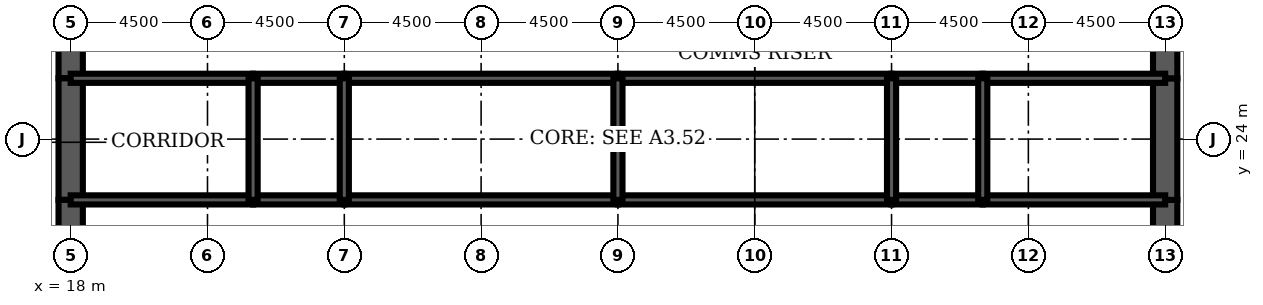
"""IFC4 building model, lengths in metres.
Left out: names, types, materials, properties, quantities, classifications, styles, units other than length and angle.
Written with IfcOpenShell. Run it as: python <this file> out.ifc"""

import sys

from ifc_helpers import new_model, si_unit, direction, frame, frame_2d, origin, place, context, subcontext, project, spatial, rectangle, extrude, element, fill, save


model = new_model("IFC4")
c1 = context("Model", 3, precision=1e-05, world=origin(), true_north=direction((0.0, 1.0)))
c2 = subcontext(c1, "Body", "Model", "MODEL_VIEW")
j1 = project(units=[si_unit("LENGTHUNIT", "METRE"), si_unit("PLANEANGLEUNIT", "RADIAN")], contexts=[c1])
p1 = place(None, origin())
s1 = spatial("IfcSite", under=j1, at=p1, CompositionType="ELEMENT")
p2 = place(p1, origin())
s2 = spatial("IfcBuilding", under=s1, at=p2, CompositionType="ELEMENT")
p3 = place(p2, frame((0.0, 0.0, 223.6)))
s3 = spatial("IfcBuildingStorey", under=s2, at=p3, CompositionType="ELEMENT", Elevation=223.6)
p4 = place(p3, frame((18.0, 28.8, 0.0), z_axis=(0.0, 0.0, 1.0), x_axis=(0.0, -1.0, 0.0)))
e1 = element("IfcWall", 1, at=p4, inside=s3, PredefinedType="SHEAR", context=c2, shape_type="SweptSolid", body=[
    extrude(rectangle(XDim=2.8, YDim=0.8, at=frame_2d((1.4, 0.0))), origin(), (0.0, 0.0, 1.0), 4.2),
])
p5 = place(p4, frame((0.4, 0.0, 0.0)))
e2 = element("IfcOpeningElement", 2, at=p5, cuts=e1, PredefinedType="OPENING", context=c2, shape_type="SweptSolid", body=[
    extrude(rectangle(XDim=1.8, YDim=2.1, at=frame_2d((0.9, 1.05))), frame((0.0, 0.41, 0.0), z_axis=(0.0, -1.0, 0.0), x_axis=(1.0, 0.0, 0.0)), (0.0, 0.0, 1.0), 0.82),
])
p6 = place(p3, frame((18.0, 26.0, 0.0), z_axis=(0.0, 0.0, 1.0), x_axis=(0.0, -1.0, 0.0)))
e3 = element("IfcWall", 3, at=p6, inside=s3, PredefinedType="SHEAR", context=c2, shape_type="SweptSolid", body=[
    extrude(rectangle(XDim=4.0, YDim=0.8, at=frame_2d((2.0, 0.0))), origin(), (0.0, 0.0, 1.0), 4.2),
])
p7 = place(p3, frame((18.0, 22.0, 0.0), z_axis=(0.0, 0.0, 1.0), x_axis=(0.0, -1.0, 0.0)))
e4 = element("IfcWall", 4, at=p7, inside=s3, PredefinedType="SHEAR", context=c2, shape_type="SweptSolid", body=[
    extrude(rectangle(XDim=2.8, YDim=0.8, at=frame_2d((1.4, 0.0))), origin(), (0.0, 0.0, 1.0), 4.2),
])
p8 = place(p7, frame((0.6, 0.0, 0.0)))
e5 = element("IfcOpeningElement", 5, at=p8, cuts=e4, PredefinedType="OPENING", context=c2, shape_type="SweptSolid", body=[
    extrude(rectangle(XDim=1.8, YDim=2.1, at=frame_2d((0.9, 1.05))), frame((0.0, 0.41, 0.0), z_axis=(0.0, -1.0, 0.0), x_axis=(1.0, 0.0, 0.0)), (0.0, 0.0, 1.0), 0.82),
])
p9 = place(p3, frame((54.0, 19.2, 0.0), z_axis=(0.0, 0.0, 1.0), x_axis=(0.0, 1.0, 0.0)))
e6 = element("IfcWall", 6, at=p9, inside=s3, PredefinedType="SHEAR", context=c2, shape_type="SweptSolid", body=[
    extrude(rectangle(XDim=2.8, YDim=0.8, at=frame_2d((1.4, 0.0))), origin(), (0.0, 0.0, 1.0), 4.2),
])
p10 = place(p9, frame((0.4, 0.0, 0.0)))
e7 = element("IfcOpeningElement", 7, at=p10, cuts=e6, PredefinedType="OPENING", context=c2, shape_type="SweptSolid", body=[
    extrude(rectangle(XDim=1.8, YDim=2.1, at=frame_2d((0.9, 1.05))), frame((0.0, 0.41, 0.0), z_axis=(0.0, -1.0, 0.0), x_axis=(1.0, 0.0, 0.0)), (0.0, 0.0, 1.0), 0.82),
])
p11 = place(p3, frame((54.0, 22.0, 0.0), z_axis=(0.0, 0.0, 1.0), x_axis=(0.0, 1.0, 0.0)))
e8 = element("IfcWall", 8, at=p11, inside=s3, PredefinedType="SHEAR", context=c2, shape_type="SweptSolid", body=[
    extrude(rectangle(XDim=4.0, YDim=0.8, at=frame_2d((2.0, 0.0))), origin(), (0.0, 0.0, 1.0), 4.2),
])
p12 = place(p3, frame((54.0, 26.0, 0.0), z_axis=(0.0, 0.0, 1.0), x_axis=(0.0, 1.0, 0.0)))
e9 = element("IfcWall", 9, at=p12, inside=s3, PredefinedType="SHEAR", context=c2, shape_type="SweptSolid", body=[
    extrude(rectangle(XDim=2.8, YDim=0.8, at=frame_2d((1.4, 0.0))), origin(), (0.0, 0.0, 1.0), 4.2),
])
p13 = place(p12, frame((0.6, 0.0, 0.0)))
e10 = element("IfcOpeningElement", 10, at=p13, cuts=e9, PredefinedType="OPENING", context=c2, shape_type="SweptSolid", body=[
    extrude(rectangle(XDim=1.8, YDim=2.1, at=frame_2d((0.9, 1.05))), frame((0.0, 0.41, 0.0), z_axis=(0.0, -1.0, 0.0), x_axis=(1.0, 0.0, 0.0)), (0.0, 0.0, 1.0), 0.82),
])
p14 = place(p3, frame((18.0, 22.0, 0.0), z_axis=(0.0, 0.0, 1.0), x_axis=(1.0, 0.0, 0.0)))
e11 = element("IfcWall", 11, at=p14, inside=s3, PredefinedType="SOLIDWALL", context=c2, shape_type="SweptSolid", body=[
    extrude(rectangle(XDim=6.0, YDim=0.3, at=frame_2d((3.0, 0.0))), origin(), (0.0, 0.0, 1.0), 4.2),
])
p15 = place(p14, frame((2.0, 0.0, 0.0)))
e12 = element("IfcOpeningElement", 12, at=p15, cuts=e11, PredefinedType="OPENING", context=c2, shape_type="SweptSolid", body=[
    extrude(rectangle(XDim=1.0, YDim=2.1, at=frame_2d((0.5, 1.05))), frame((0.0, 0.16, 0.0), z_axis=(0.0, -1.0, 0.0), x_axis=(1.0, 0.0, 0.0)), (0.0, 0.0, 1.0), 0.32),
])
p16 = place(p3, frame((24.0, 22.0, 0.0), z_axis=(0.0, 0.0, 1.0), x_axis=(1.0, 0.0, 0.0)))
e13 = element("IfcWall", 13, at=p16, inside=s3, PredefinedType="SOLIDWALL", context=c2, shape_type="SweptSolid", body=[
    extrude(rectangle(XDim=3.0, YDim=0.3, at=frame_2d((1.5, 0.0))), origin(), (0.0, 0.0, 1.0), 4.2),
])
p17 = place(p16, frame((1.0, 0.0, 0.0)))
e14 = element("IfcOpeningElement", 14, at=p17, cuts=e13, PredefinedType="OPENING", context=c2, shape_type="SweptSolid", body=[
    extrude(rectangle(XDim=1.0, YDim=2.1, at=frame_2d((0.5, 1.05))), frame((0.0, 0.16, 0.0), z_axis=(0.0, -1.0, 0.0), x_axis=(1.0, 0.0, 0.0)), (0.0, 0.0, 1.0), 0.32),
])
p18 = place(p3, frame((27.0, 22.0, 0.0), z_axis=(0.0, 0.0, 1.0), x_axis=(1.0, 0.0, 0.0)))
e15 = element("IfcWall", 15, at=p18, inside=s3, PredefinedType="SOLIDWALL", context=c2, shape_type="SweptSolid", body=[
    extrude(rectangle(XDim=9.0, YDim=0.3, at=frame_2d((4.5, 0.0))), origin(), (0.0, 0.0, 1.0), 4.2),
])
p19 = place(p18, frame((4.0, 0.0, 0.0)))
e16 = element("IfcOpeningElement", 16, at=p19, cuts=e15, PredefinedType="OPENING", context=c2, shape_type="SweptSolid", body=[
    extrude(rectangle(XDim=1.0, YDim=2.1, at=frame_2d((0.5, 1.05))), frame((0.0, 0.16, 0.0), z_axis=(0.0, -1.0, 0.0), x_axis=(1.0, 0.0, 0.0)), (0.0, 0.0, 1.0), 0.32),
])
p20 = place(p3, frame((36.0, 22.0, 0.0), z_axis=(0.0, 0.0, 1.0), x_axis=(1.0, 0.0, 0.0)))
e17 = element("IfcWall", 17, at=p20, inside=s3, PredefinedType="SOLIDWALL", context=c2, shape_type="SweptSolid", body=[
    extrude(rectangle(XDim=9.0, YDim=0.3, at=frame_2d((4.5, 0.0))), origin(), (0.0, 0.0, 1.0), 4.2),
])
p21 = place(p20, frame((4.0, 0.0, 0.0)))
e18 = element("IfcOpeningElement", 18, at=p21, cuts=e17, PredefinedType="OPENING", context=c2, shape_type="SweptSolid", body=[
    extrude(rectangle(XDim=1.0, YDim=2.1, at=frame_2d((0.5, 1.05))), frame((0.0, 0.16, 0.0), z_axis=(0.0, -1.0, 0.0), x_axis=(1.0, 0.0, 0.0)), (0.0, 0.0, 1.0), 0.32),
])
p22 = place(p3, frame((45.0, 22.0, 0.0), z_axis=(0.0, 0.0, 1.0), x_axis=(1.0, 0.0, 0.0)))
e19 = element("IfcWall", 19, at=p22, inside=s3, PredefinedType="SOLIDWALL", context=c2, shape_type="SweptSolid", body=[
    extrude(rectangle(XDim=3.0, YDim=0.3, at=frame_2d((1.5, 0.0))), origin(), (0.0, 0.0, 1.0), 4.2),
])
p23 = place(p22, frame((1.0, 0.0, 0.0)))
e20 = element("IfcOpeningElement", 20, at=p23, cuts=e19, PredefinedType="OPENING", context=c2, shape_type="SweptSolid", body=[
    extrude(rectangle(XDim=1.0, YDim=2.1, at=frame_2d((0.5, 1.05))), frame((0.0, 0.16, 0.0), z_axis=(0.0, -1.0, 0.0), x_axis=(1.0, 0.0, 0.0)), (0.0, 0.0, 1.0), 0.32),
])
p24 = place(p3, frame((48.0, 22.0, 0.0), z_axis=(0.0, 0.0, 1.0), x_axis=(1.0, 0.0, 0.0)))
e21 = element("IfcWall", 21, at=p24, inside=s3, PredefinedType="SOLIDWALL", context=c2, shape_type="SweptSolid", body=[
    extrude(rectangle(XDim=6.0, YDim=0.3, at=frame_2d((3.0, 0.0))), origin(), (0.0, 0.0, 1.0), 4.2),
])
p25 = place(p24, frame((2.0, 0.0, 0.0)))
e22 = element("IfcOpeningElement", 22, at=p25, cuts=e21, PredefinedType="OPENING", context=c2, shape_type="SweptSolid", body=[
    extrude(rectangle(XDim=1.0, YDim=2.1, at=frame_2d((0.5, 1.05))), frame((0.0, 0.16, 0.0), z_axis=(0.0, -1.0, 0.0), x_axis=(1.0, 0.0, 0.0)), (0.0, 0.0, 1.0), 0.32),
])
p26 = place(p24, frame((4.35, 0.0, 0.0)))
e23 = element("IfcOpeningElement", 23, at=p26, cuts=e21, PredefinedType="OPENING", context=c2, shape_type="SweptSolid", body=[
    extrude(rectangle(XDim=1.0, YDim=2.1, at=frame_2d((0.5, 1.05))), frame((0.0, 0.16, 0.0), z_axis=(0.0, -1.0, 0.0), x_axis=(1.0, 0.0, 0.0)), (0.0, 0.0, 1.0), 0.32),
])
p27 = place(p3, frame((18.0, 26.0, 0.0), z_axis=(0.0, 0.0, 1.0), x_axis=(1.0, 0.0, 0.0)))
e24 = element("IfcWall", 24, at=p27, inside=s3, PredefinedType="SOLIDWALL", context=c2, shape_type="SweptSolid", body=[
    extrude(rectangle(XDim=6.0, YDim=0.3, at=frame_2d((3.0, 0.0))), origin(), (0.0, 0.0, 1.0), 4.2),
])
p28 = place(p3, frame((24.0, 26.0, 0.0), z_axis=(0.0, 0.0, 1.0), x_axis=(1.0, 0.0, 0.0)))
e25 = element("IfcWall", 25, at=p28, inside=s3, PredefinedType="SOLIDWALL", context=c2, shape_type="SweptSolid", body=[
    extrude(rectangle(XDim=3.0, YDim=0.3, at=frame_2d((1.5, 0.0))), origin(), (0.0, 0.0, 1.0), 4.2),
])
for number, where, z_axis, x_axis in (
    (26, (27.0, 26.0, 0.0), (0.0, 0.0, 1.0), (1.0, 0.0, 0.0)),
    (27, (36.0, 26.0, 0.0), (0.0, 0.0, 1.0), (1.0, 0.0, 0.0)),
):
    element("IfcWall", number, at=place(p3, frame(where, z_axis=z_axis, x_axis=x_axis)), inside=s3, PredefinedType="SOLIDWALL", context=c2, shape_type="SweptSolid", body=[
        extrude(rectangle(XDim=9.0, YDim=0.3, at=frame_2d((4.5, 0.0))), origin(), (0.0, 0.0, 1.0), 4.2),
    ])
p29 = place(p3, frame((45.0, 26.0, 0.0), z_axis=(0.0, 0.0, 1.0), x_axis=(1.0, 0.0, 0.0)))
e28 = element("IfcWall", 28, at=p29, inside=s3, PredefinedType="SOLIDWALL", context=c2, shape_type="SweptSolid", body=[
    extrude(rectangle(XDim=3.0, YDim=0.3, at=frame_2d((1.5, 0.0))), origin(), (0.0, 0.0, 1.0), 4.2),
])
p30 = place(p3, frame((48.0, 26.0, 0.0), z_axis=(0.0, 0.0, 1.0), x_axis=(1.0, 0.0, 0.0)))
e29 = element("IfcWall", 29, at=p30, inside=s3, PredefinedType="SOLIDWALL", context=c2, shape_type="SweptSolid", body=[
    extrude(rectangle(XDim=6.0, YDim=0.3, at=frame_2d((3.0, 0.0))), origin(), (0.0, 0.0, 1.0), 4.2),
])
for number, where, z_axis, x_axis in (
    (30, (24.0, 22.0, 0.0), (0.0, 0.0, 1.0), (0.0, 1.0, 0.0)),
    (31, (27.0, 22.0, 0.0), (0.0, 0.0, 1.0), (0.0, 1.0, 0.0)),
    (32, (36.0, 22.0, 0.0), (0.0, 0.0, 1.0), (0.0, 1.0, 0.0)),
    (33, (45.0, 22.0, 0.0), (0.0, 0.0, 1.0), (0.0, 1.0, 0.0)),
    (34, (48.0, 22.0, 0.0), (0.0, 0.0, 1.0), (0.0, 1.0, 0.0)),
):
    element("IfcWall", number, at=place(p3, frame(where, z_axis=z_axis, x_axis=x_axis)), inside=s3, PredefinedType="SOLIDWALL", context=c2, shape_type="SweptSolid", body=[
        extrude(rectangle(XDim=4.0, YDim=0.3, at=frame_2d((2.0, 0.0))), origin(), (0.0, 0.0, 1.0), 4.2),
    ])
p31 = place(p3, frame((42.0, 22.15, 0.0), z_axis=(0.0, 0.0, 1.0), x_axis=(0.0, 1.0, 0.0)))
e35 = element("IfcWall", 35, at=p31, inside=s3, PredefinedType="PARTITIONING", context=c2, shape_type="SweptSolid", body=[
    extrude(rectangle(XDim=3.7, YDim=0.15, at=frame_2d((1.85, 0.0))), origin(), (0.0, 0.0, 1.0), 3.0),
])
p32 = place(p31, frame((2.2, 0.0, 0.0)))
e36 = element("IfcOpeningElement", 36, at=p32, cuts=e35, PredefinedType="OPENING", context=c2, shape_type="SweptSolid", body=[
    extrude(rectangle(XDim=1.0, YDim=2.1, at=frame_2d((0.5, 1.05))), frame((0.0, 0.085, 0.0), z_axis=(0.0, -1.0, 0.0), x_axis=(1.0, 0.0, 0.0)), (0.0, 0.0, 1.0), 0.17),
])
p33 = place(p3, frame((52.025, 22.15, 0.0), z_axis=(0.0, 0.0, 1.0), x_axis=(0.0, 1.0, 0.0)))
e37 = element("IfcWall", 37, at=p33, inside=s3, PredefinedType="PARTITIONING", context=c2, shape_type="SweptSolid", body=[
    extrude(rectangle(XDim=3.7, YDim=0.15, at=frame_2d((1.85, 0.0))), origin(), (0.0, 0.0, 1.0), 3.0),
])
p34 = place(p32, origin())
e38 = element("IfcDoor", 38, at=p34, inside=s3, OperationType="SINGLE_SWING_RIGHT", PredefinedType="DOOR", context=c2, shape_type="SweptSolid", body=[
    extrude(rectangle(XDim=1.0, YDim=2.1, at=frame_2d((0.5, 1.05))), frame((0.0, 0.025, 0.0), z_axis=(0.0, -1.0, 0.0), x_axis=(1.0, 0.0, 0.0)), (0.0, 0.0, 1.0), 0.05),
])
fill(e36, e38)
p35 = place(p8, origin())
e39 = element("IfcDoor", 39, at=p35, inside=s3, OperationType="SINGLE_SWING_LEFT", PredefinedType="DOOR", context=c2, shape_type="SweptSolid", body=[
    extrude(rectangle(XDim=1.8, YDim=2.1, at=frame_2d((0.9, 1.05))), frame((0.0, 0.4, 0.0), z_axis=(0.0, -1.0, 0.0), x_axis=(1.0, 0.0, 0.0)), (0.0, 0.0, 1.0), 0.8),
])
fill(e5, e39)
p36 = place(p5, origin())
e40 = element("IfcDoor", 40, at=p36, inside=s3, OperationType="SINGLE_SWING_LEFT", PredefinedType="DOOR", context=c2, shape_type="SweptSolid", body=[
    extrude(rectangle(XDim=1.8, YDim=2.1, at=frame_2d((0.9, 1.05))), frame((0.0, 0.4, 0.0), z_axis=(0.0, -1.0, 0.0), x_axis=(1.0, 0.0, 0.0)), (0.0, 0.0, 1.0), 0.8),
])
fill(e2, e40)
p37 = place(p10, origin())
e41 = element("IfcDoor", 41, at=p37, inside=s3, OperationType="SINGLE_SWING_LEFT", PredefinedType="DOOR", context=c2, shape_type="SweptSolid", body=[
    extrude(rectangle(XDim=1.8, YDim=2.1, at=frame_2d((0.9, 1.05))), frame((0.0, 0.4, 0.0), z_axis=(0.0, -1.0, 0.0), x_axis=(1.0, 0.0, 0.0)), (0.0, 0.0, 1.0), 0.8),
])
fill(e7, e41)
p38 = place(p13, origin())
e42 = element("IfcDoor", 42, at=p38, inside=s3, OperationType="SINGLE_SWING_LEFT", PredefinedType="DOOR", context=c2, shape_type="SweptSolid", body=[
    extrude(rectangle(XDim=1.8, YDim=2.1, at=frame_2d((0.9, 1.05))), frame((0.0, 0.4, 0.0), z_axis=(0.0, -1.0, 0.0), x_axis=(1.0, 0.0, 0.0)), (0.0, 0.0, 1.0), 0.8),
])
fill(e10, e42)
p39 = place(p15, origin())
e43 = element("IfcDoor", 43, at=p39, inside=s3, OperationType="SINGLE_SWING_LEFT", PredefinedType="DOOR", context=c2, shape_type="SweptSolid", body=[
    extrude(rectangle(XDim=1.0, YDim=2.1, at=frame_2d((0.5, 1.05))), frame((0.0, 0.025, 0.0), z_axis=(0.0, -1.0, 0.0), x_axis=(1.0, 0.0, 0.0)), (0.0, 0.0, 1.0), 0.05),
])
fill(e12, e43)
p40 = place(p17, origin())
e44 = element("IfcDoor", 44, at=p40, inside=s3, OperationType="SINGLE_SWING_LEFT", PredefinedType="DOOR", context=c2, shape_type="SweptSolid", body=[
    extrude(rectangle(XDim=1.0, YDim=2.1, at=frame_2d((0.5, 1.05))), frame((0.0, 0.025, 0.0), z_axis=(0.0, -1.0, 0.0), x_axis=(1.0, 0.0, 0.0)), (0.0, 0.0, 1.0), 0.05),
])
fill(e14, e44)
p41 = place(p19, origin())
e45 = element("IfcDoor", 45, at=p41, inside=s3, OperationType="SINGLE_SWING_LEFT", PredefinedType="DOOR", context=c2, shape_type="SweptSolid", body=[
    extrude(rectangle(XDim=1.0, YDim=2.1, at=frame_2d((0.5, 1.05))), frame((0.0, 0.025, 0.0), z_axis=(0.0, -1.0, 0.0), x_axis=(1.0, 0.0, 0.0)), (0.0, 0.0, 1.0), 0.05),
])
fill(e16, e45)
p42 = place(p21, origin())
e46 = element("IfcDoor", 46, at=p42, inside=s3, OperationType="SINGLE_SWING_LEFT", PredefinedType="DOOR", context=c2, shape_type="SweptSolid", body=[
    extrude(rectangle(XDim=1.0, YDim=2.1, at=frame_2d((0.5, 1.05))), frame((0.0, 0.025, 0.0), z_axis=(0.0, -1.0, 0.0), x_axis=(1.0, 0.0, 0.0)), (0.0, 0.0, 1.0), 0.05),
])
fill(e18, e46)
p43 = place(p23, origin())
e47 = element("IfcDoor", 47, at=p43, inside=s3, OperationType="SINGLE_SWING_LEFT", PredefinedType="DOOR", context=c2, shape_type="SweptSolid", body=[
    extrude(rectangle(XDim=1.0, YDim=2.1, at=frame_2d((0.5, 1.05))), frame((0.0, 0.025, 0.0), z_axis=(0.0, -1.0, 0.0), x_axis=(1.0, 0.0, 0.0)), (0.0, 0.0, 1.0), 0.05),
])
fill(e20, e47)
p44 = place(p25, origin())
e48 = element("IfcDoor", 48, at=p44, inside=s3, OperationType="SINGLE_SWING_LEFT", PredefinedType="DOOR", context=c2, shape_type="SweptSolid", body=[
    extrude(rectangle(XDim=1.0, YDim=2.1, at=frame_2d((0.5, 1.05))), frame((0.0, 0.025, 0.0), z_axis=(0.0, -1.0, 0.0), x_axis=(1.0, 0.0, 0.0)), (0.0, 0.0, 1.0), 0.05),
])
fill(e22, e48)
p45 = place(p26, origin())
e49 = element("IfcDoor", 49, at=p45, inside=s3, OperationType="SINGLE_SWING_RIGHT", PredefinedType="DOOR", context=c2, shape_type="SweptSolid", body=[
    extrude(rectangle(XDim=1.0, YDim=2.1, at=frame_2d((0.5, 1.05))), frame((0.0, 0.025, 0.0), z_axis=(0.0, -1.0, 0.0), x_axis=(1.0, 0.0, 0.0)), (0.0, 0.0, 1.0), 0.05),
])
fill(e23, e49)
save(model, sys.argv[1])
